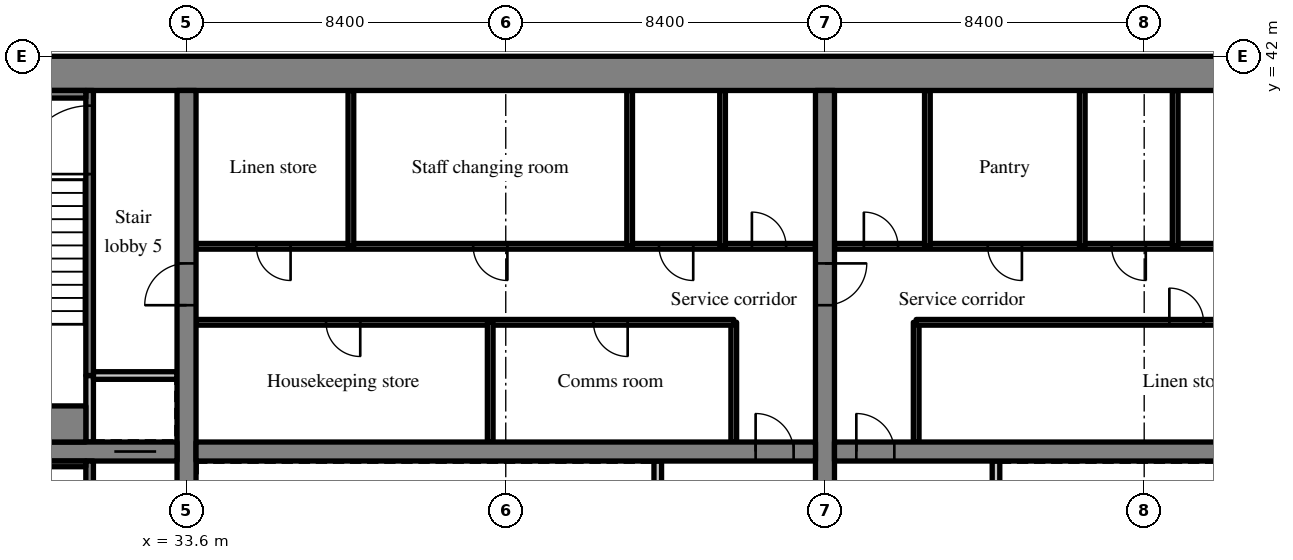
"""IFC4 building model, lengths in metres.
Left out: names, types, materials, properties, quantities, classifications, styles, units other than length and angle.
Written with IfcOpenShell. Run it as: python <this file> out.ifc"""

import sys

from ifc_helpers import new_model, si_unit, direction, frame, frame_2d, origin, place, context, subcontext, project, spatial, rectangle, extrude, source, transform, mapped, element, fill, save


model = new_model("IFC4")
c1 = context("Model", 3, precision=1e-05, world=origin(), true_north=direction((0.0, 1.0)))
c2 = subcontext(c1, "Body", "Model", "MODEL_VIEW")
j1 = project(units=[si_unit("LENGTHUNIT", "METRE"), si_unit("PLANEANGLEUNIT", "RADIAN")], contexts=[c1])
p1 = place(None, origin())
s1 = spatial("IfcSite", under=j1, at=p1, CompositionType="ELEMENT")
p2 = place(p1, origin())
s2 = spatial("IfcBuilding", under=s1, at=p2, CompositionType="ELEMENT")
p3 = place(p2, frame((0.0, 0.0, 102.8)))
s3 = spatial("IfcBuildingStorey", under=s2, at=p3, CompositionType="ELEMENT", Elevation=102.8)
m1 = source(origin(), c2, "Body", "SweptSolid", [
    extrude(rectangle(XDim=50.4, YDim=0.9, at=frame_2d((25.2, 0.0))), origin(), (0.0, 0.0, 1.0), 3.52),
])
p4 = place(p3, frame((25.2, 41.55, 0.0), z_axis=(0.0, 0.0, 1.0), x_axis=(1.0, 0.0, 0.0)))
e1 = element("IfcWall", 1, at=p4, inside=s3, PredefinedType="SHEAR", context=c2, shape_type="MappedRepresentation", body=[
    mapped(m1, transform((0.0, 0.0, 0.0), scale=1.0)),
])
m2 = source(origin(), c2, "Body", "SweptSolid", [
    extrude(rectangle(XDim=18.2, YDim=0.5, at=frame_2d((9.1, 0.0))), origin(), (0.0, 0.0, 1.0), 3.52),
])
p5 = place(p3, frame((33.6, 22.9, 0.0), z_axis=(0.0, 0.0, 1.0), x_axis=(0.0, 1.0, 0.0)))
e2 = element("IfcWall", 2, at=p5, inside=s3, PredefinedType="SHEAR", context=c2, shape_type="MappedRepresentation", body=[
    mapped(m2, transform((0.0, 0.0, 0.0), scale=1.0)),
])
m3 = source(origin(), c2, "Body", "SweptSolid", [
    extrude(rectangle(XDim=1.1, YDim=2.1, at=frame_2d((0.55, 1.05))), frame((0.0, 0.26, 0.0), z_axis=(0.0, -1.0, 0.0), x_axis=(1.0, 0.0, 0.0)), (0.0, 0.0, 1.0), 0.52),
])
p6 = place(p5, frame((12.55, 0.0, 0.0)))
e3 = element("IfcOpeningElement", 3, at=p6, cuts=e2, PredefinedType="OPENING", context=c2, shape_type="MappedRepresentation", body=[
    mapped(m3, transform((0.0, 0.0, 0.0), scale=1.0)),
])
p7 = place(p3, frame((50.4, 22.9, 0.0), z_axis=(0.0, 0.0, 1.0), x_axis=(0.0, 1.0, 0.0)))
e4 = element("IfcWall", 4, at=p7, inside=s3, PredefinedType="SHEAR", context=c2, shape_type="MappedRepresentation", body=[
    mapped(m2, transform((0.0, 0.0, 0.0), scale=1.0)),
])
p8 = place(p7, frame((12.55, 0.0, 0.0)))
e5 = element("IfcOpeningElement", 5, at=p8, cuts=e4, PredefinedType="OPENING", context=c2, shape_type="MappedRepresentation", body=[
    mapped(m3, transform((0.0, 0.0, 0.0), scale=1.0)),
])
m4 = source(origin(), c2, "Body", "SweptSolid", [
    extrude(rectangle(XDim=7.25, YDim=0.5, at=frame_2d((3.625, 0.0))), origin(), (0.0, 0.0, 1.0), 3.52),
])
p9 = place(p3, frame((26.1, 31.6, 0.0), z_axis=(0.0, 0.0, 1.0), x_axis=(1.0, 0.0, 0.0)))
e6 = element("IfcWall", 6, at=p9, inside=s3, PredefinedType="SHEAR", context=c2, shape_type="MappedRepresentation", body=[
    mapped(m4, transform((0.0, 0.0, 0.0), scale=1.0)),
])
p10 = place(p9, frame((5.6, 0.0, 0.0)))
e7 = element("IfcOpeningElement", 7, at=p10, cuts=e6, PredefinedType="OPENING", context=c2, shape_type="MappedRepresentation", body=[
    mapped(m3, transform((0.0, 0.0, 0.0), scale=1.0)),
])
m5 = source(origin(), c2, "Body", "SweptSolid", [
    extrude(rectangle(XDim=16.3, YDim=0.5, at=frame_2d((8.15, 0.0))), origin(), (0.0, 0.0, 1.0), 3.52),
])
p11 = place(p3, frame((33.85, 31.6, 0.0), z_axis=(0.0, 0.0, 1.0), x_axis=(1.0, 0.0, 0.0)))
e8 = element("IfcWall", 8, at=p11, inside=s3, PredefinedType="SHEAR", context=c2, shape_type="MappedRepresentation", body=[
    mapped(m5, transform((0.0, 0.0, 0.0), scale=1.0)),
])
m6 = source(origin(), c2, "Body", "SweptSolid", [
    extrude(rectangle(XDim=1.0, YDim=2.1, at=frame_2d((0.5, 1.05))), frame((0.0, 0.26, 0.0), z_axis=(0.0, -1.0, 0.0), x_axis=(1.0, 0.0, 0.0)), (0.0, 0.0, 1.0), 0.52),
])
p12 = place(p11, frame((14.725, 0.0, 0.0)))
e9 = element("IfcOpeningElement", 9, at=p12, cuts=e8, PredefinedType="OPENING", context=c2, shape_type="MappedRepresentation", body=[
    mapped(m6, transform((0.0, 0.0, 0.0), scale=1.0)),
])
m7 = source(origin(), c2, "Body", "SweptSolid", [
    extrude(rectangle(XDim=16.3, YDim=0.5, at=frame_2d((8.15, 0.0))), origin(), (0.0, 0.0, 1.0), 3.52),
])
p13 = place(p3, frame((50.65, 31.6, 0.0), z_axis=(0.0, 0.0, 1.0), x_axis=(1.0, 0.0, 0.0)))
e10 = element("IfcWall", 10, at=p13, inside=s3, PredefinedType="SHEAR", context=c2, shape_type="MappedRepresentation", body=[
    mapped(m7, transform((0.0, 0.0, 0.0), scale=1.0)),
])
p14 = place(p13, frame((0.575, 0.0, 0.0)))
e11 = element("IfcOpeningElement", 11, at=p14, cuts=e10, PredefinedType="OPENING", context=c2, shape_type="MappedRepresentation", body=[
    mapped(m6, transform((0.0, 0.0, 0.0), scale=1.0)),
])
m8 = source(origin(), c2, "Body", "SweptSolid", [
    extrude(rectangle(XDim=2.55, YDim=0.2, at=frame_2d((1.275, 0.0))), origin(), (0.0, 0.0, 1.0), 3.52),
])
p15 = place(p3, frame((46.0, 28.8, 0.0), z_axis=(0.0, 0.0, 1.0), x_axis=(0.0, 1.0, 0.0)))
e12 = element("IfcWall", 12, at=p15, inside=s3, PredefinedType="SOLIDWALL", context=c2, shape_type="MappedRepresentation", body=[
    mapped(m8, transform((0.0, 0.0, 0.0), scale=1.0)),
])
m9 = source(origin(), c2, "Body", "SweptSolid", [
    extrude(rectangle(XDim=3.15, YDim=0.15, at=frame_2d((1.575, 0.0))), origin(), (0.0, 0.0, 1.0), 3.52),
])
p16 = place(p3, frame((48.0, 31.85, 0.0), z_axis=(0.0, 0.0, 1.0), x_axis=(0.0, 1.0, 0.0)))
e13 = element("IfcWall", 13, at=p16, inside=s3, PredefinedType="PARTITIONING", context=c2, shape_type="MappedRepresentation", body=[
    mapped(m9, transform((0.0, 0.0, 0.0), scale=1.0)),
])
m10 = source(origin(), c2, "Body", "SweptSolid", [
    extrude(rectangle(XDim=14.15, YDim=0.15, at=frame_2d((7.075, 0.0))), origin(), (0.0, 0.0, 1.0), 3.52),
])
p17 = place(p3, frame((33.85, 35.0, 0.0), z_axis=(0.0, 0.0, 1.0), x_axis=(1.0, 0.0, 0.0)))
e14 = element("IfcWall", 14, at=p17, inside=s3, PredefinedType="PARTITIONING", context=c2, shape_type="MappedRepresentation", body=[
    mapped(m10, transform((0.0, 0.0, 0.0), scale=1.0)),
])
m11 = source(origin(), c2, "Body", "SweptSolid", [
    extrude(rectangle(XDim=0.9, YDim=2.1, at=frame_2d((0.45, 1.05))), frame((0.0, 0.085, 0.0), z_axis=(0.0, -1.0, 0.0), x_axis=(1.0, 0.0, 0.0)), (0.0, 0.0, 1.0), 0.17),
])
p18 = place(p17, frame((3.421, 0.0, 0.0)))
e15 = element("IfcOpeningElement", 15, at=p18, cuts=e14, PredefinedType="OPENING", context=c2, shape_type="MappedRepresentation", body=[
    mapped(m11, transform((0.0, 0.0, 0.0), scale=1.0)),
])
p19 = place(p17, frame((10.458, 0.0, 0.0)))
e16 = element("IfcOpeningElement", 16, at=p19, cuts=e14, PredefinedType="OPENING", context=c2, shape_type="MappedRepresentation", body=[
    mapped(m11, transform((0.0, 0.0, 0.0), scale=1.0)),
])
m12 = source(origin(), c2, "Body", "SweptSolid", [
    extrude(rectangle(XDim=16.3, YDim=0.15, at=frame_2d((8.15, 0.0))), origin(), (0.0, 0.0, 1.0), 3.52),
])
p20 = place(p3, frame((33.85, 37.0, 0.0), z_axis=(0.0, 0.0, 1.0), x_axis=(1.0, 0.0, 0.0)))
e17 = element("IfcWall", 17, at=p20, inside=s3, PredefinedType="PARTITIONING", context=c2, shape_type="MappedRepresentation", body=[
    mapped(m12, transform((0.0, 0.0, 0.0), scale=1.0)),
])
p21 = place(p20, frame((1.588, 0.0, 0.0)))
e18 = element("IfcOpeningElement", 18, at=p21, cuts=e17, PredefinedType="OPENING", context=c2, shape_type="MappedRepresentation", body=[
    mapped(m11, transform((0.0, 0.0, 0.0), scale=1.0)),
])
p22 = place(p20, frame((7.293, 0.0, 0.0)))
e19 = element("IfcOpeningElement", 19, at=p22, cuts=e17, PredefinedType="OPENING", context=c2, shape_type="MappedRepresentation", body=[
    mapped(m11, transform((0.0, 0.0, 0.0), scale=1.0)),
])
p23 = place(p20, frame((12.183, 0.0, 0.0)))
e20 = element("IfcOpeningElement", 20, at=p23, cuts=e17, PredefinedType="OPENING", context=c2, shape_type="MappedRepresentation", body=[
    mapped(m11, transform((0.0, 0.0, 0.0), scale=1.0)),
])
p24 = place(p20, frame((14.627, 0.0, 0.0)))
e21 = element("IfcOpeningElement", 21, at=p24, cuts=e17, PredefinedType="OPENING", context=c2, shape_type="MappedRepresentation", body=[
    mapped(m11, transform((0.0, 0.0, 0.0), scale=1.0)),
])
p25 = place(p3, frame((41.591, 31.85, 0.0), z_axis=(0.0, 0.0, 1.0), x_axis=(0.0, 1.0, 0.0)))
e22 = element("IfcWall", 22, at=p25, inside=s3, PredefinedType="PARTITIONING", context=c2, shape_type="MappedRepresentation", body=[
    mapped(m9, transform((0.0, 0.0, 0.0), scale=1.0)),
])
m13 = source(origin(), c2, "Body", "SweptSolid", [
    extrude(rectangle(XDim=4.1, YDim=0.15, at=frame_2d((2.05, 0.0))), origin(), (0.0, 0.0, 1.0), 3.52),
])
for number, where, z_axis, x_axis in (
    (23, (37.925, 37.0, 0.0), (0.0, 0.0, 1.0), (0.0, 1.0, 0.0)),
    (24, (45.26, 37.0, 0.0), (0.0, 0.0, 1.0), (0.0, 1.0, 0.0)),
    (25, (47.705, 37.0, 0.0), (0.0, 0.0, 1.0), (0.0, 1.0, 0.0)),
):
    element("IfcWall", number, at=place(p3, frame(where, z_axis=z_axis, x_axis=x_axis)), inside=s3, PredefinedType="PARTITIONING", context=c2, shape_type="MappedRepresentation", body=[
        mapped(m13, transform((0.0, 0.0, 0.0), scale=1.0)),
    ])
m14 = source(origin(), c2, "Body", "SweptSolid", [
    extrude(rectangle(XDim=8.45, YDim=0.2, at=frame_2d((4.225, 0.0))), origin(), (0.0, 0.0, 1.0), 3.52),
])
p26 = place(p3, frame((54.9, 22.9, 0.0), z_axis=(0.0, 0.0, 1.0), x_axis=(0.0, 1.0, 0.0)))
e26 = element("IfcWall", 26, at=p26, inside=s3, PredefinedType="PARTITIONING", context=c2, shape_type="MappedRepresentation", body=[
    mapped(m14, transform((0.0, 0.0, 0.0), scale=1.0)),
])
p27 = place(p3, frame((52.8, 31.85, 0.0), z_axis=(0.0, 0.0, 1.0), x_axis=(0.0, 1.0, 0.0)))
e27 = element("IfcWall", 27, at=p27, inside=s3, PredefinedType="PARTITIONING", context=c2, shape_type="MappedRepresentation", body=[
    mapped(m9, transform((0.0, 0.0, 0.0), scale=1.0)),
])
p28 = place(p3, frame((66.95, 35.0, 0.0), z_axis=(0.0, 0.0, 1.0), x_axis=(-1.0, 0.0, 0.0)))
e28 = element("IfcWall", 28, at=p28, inside=s3, PredefinedType="PARTITIONING", context=c2, shape_type="MappedRepresentation", body=[
    mapped(m10, transform((0.0, 0.0, 0.0), scale=1.0)),
])
p29 = place(p28, frame((6.588, 0.0, 0.0)))
e29 = element("IfcOpeningElement", 29, at=p29, cuts=e28, PredefinedType="OPENING", context=c2, shape_type="MappedRepresentation", body=[
    mapped(m11, transform((0.0, 0.0, 0.0), scale=1.0)),
])
m15 = source(origin(), c2, "Body", "SweptSolid", [
    extrude(rectangle(XDim=16.3, YDim=0.15, at=frame_2d((8.15, 0.0))), origin(), (0.0, 0.0, 1.0), 3.52),
])
p30 = place(p3, frame((66.95, 37.0, 0.0), z_axis=(0.0, 0.0, 1.0), x_axis=(-1.0, 0.0, 0.0)))
e30 = element("IfcWall", 30, at=p30, inside=s3, PredefinedType="PARTITIONING", context=c2, shape_type="MappedRepresentation", body=[
    mapped(m15, transform((0.0, 0.0, 0.0), scale=1.0)),
])
p31 = place(p30, frame((3.218, 0.0, 0.0)))
e31 = element("IfcOpeningElement", 31, at=p31, cuts=e30, PredefinedType="OPENING", context=c2, shape_type="MappedRepresentation", body=[
    mapped(m11, transform((0.0, 0.0, 0.0), scale=1.0)),
])
p32 = place(p30, frame((8.108, 0.0, 0.0)))
e32 = element("IfcOpeningElement", 32, at=p32, cuts=e30, PredefinedType="OPENING", context=c2, shape_type="MappedRepresentation", body=[
    mapped(m11, transform((0.0, 0.0, 0.0), scale=1.0)),
])
p33 = place(p30, frame((11.368, 0.0, 0.0)))
e33 = element("IfcOpeningElement", 33, at=p33, cuts=e30, PredefinedType="OPENING", context=c2, shape_type="MappedRepresentation", body=[
    mapped(m11, transform((0.0, 0.0, 0.0), scale=1.0)),
])
p34 = place(p30, frame((14.627, 0.0, 0.0)))
e34 = element("IfcOpeningElement", 34, at=p34, cuts=e30, PredefinedType="OPENING", context=c2, shape_type="MappedRepresentation", body=[
    mapped(m11, transform((0.0, 0.0, 0.0), scale=1.0)),
])
for number, where, z_axis, x_axis in (
    (35, (59.615, 37.0, 0.0), (0.0, 0.0, 1.0), (0.0, 1.0, 0.0)),
    (36, (57.17, 37.0, 0.0), (0.0, 0.0, 1.0), (0.0, 1.0, 0.0)),
    (37, (53.095, 37.0, 0.0), (0.0, 0.0, 1.0), (0.0, 1.0, 0.0)),
):
    element("IfcWall", number, at=place(p3, frame(where, z_axis=z_axis, x_axis=x_axis)), inside=s3, PredefinedType="PARTITIONING", context=c2, shape_type="MappedRepresentation", body=[
        mapped(m13, transform((0.0, 0.0, 0.0), scale=1.0)),
    ])
m16 = source(origin(), c2, "Body", "SweptSolid", [
    extrude(rectangle(XDim=8.45, YDim=0.2, at=frame_2d((4.225, 0.0))), origin(), (0.0, 0.0, 1.0), 3.52),
])
p35 = place(p3, frame((31.05, 22.9, 0.0), z_axis=(0.0, 0.0, 1.0), x_axis=(0.0, 1.0, 0.0)))
e38 = element("IfcWall", 38, at=p35, inside=s3, PredefinedType="SOLIDWALL", context=c2, shape_type="MappedRepresentation", body=[
    mapped(m16, transform((0.0, 0.0, 0.0), scale=1.0)),
])
m17 = source(origin(), c2, "Body", "SweptSolid", [
    extrude(rectangle(XDim=1.2, YDim=2.1, at=frame_2d((0.6, 1.05))), frame((0.0, 0.11, 0.0), z_axis=(0.0, -1.0, 0.0), x_axis=(1.0, 0.0, 0.0)), (0.0, 0.0, 1.0), 0.22),
])
p36 = place(p35, frame((6.6, 0.0, 0.0)))
e39 = element("IfcOpeningElement", 39, at=p36, cuts=e38, PredefinedType="OPENING", context=c2, shape_type="MappedRepresentation", body=[
    mapped(m17, transform((0.0, 0.0, 0.0), scale=1.0)),
])
m18 = source(origin(), c2, "Body", "SweptSolid", [
    extrude(rectangle(XDim=1.75, YDim=0.2, at=frame_2d((0.875, 0.0))), origin(), (0.0, 0.0, 1.0), 3.52),
])
p37 = place(p3, frame((31.05, 31.85, 0.0), z_axis=(0.0, 0.0, 1.0), x_axis=(0.0, 1.0, 0.0)))
e40 = element("IfcWall", 40, at=p37, inside=s3, PredefinedType="SOLIDWALL", context=c2, shape_type="MappedRepresentation", body=[
    mapped(m18, transform((0.0, 0.0, 0.0), scale=1.0)),
])
m19 = source(origin(), c2, "Body", "SweptSolid", [
    extrude(rectangle(XDim=2.2, YDim=0.2, at=frame_2d((1.1, 0.0))), origin(), (0.0, 0.0, 1.0), 3.52),
])
p38 = place(p3, frame((31.15, 33.6, 0.0), z_axis=(0.0, 0.0, 1.0), x_axis=(1.0, 0.0, 0.0)))
e41 = element("IfcWall", 41, at=p38, inside=s3, PredefinedType="SOLIDWALL", context=c2, shape_type="MappedRepresentation", body=[
    mapped(m19, transform((0.0, 0.0, 0.0), scale=1.0)),
])
m20 = source(origin(), c2, "Body", "SweptSolid", [
    extrude(rectangle(XDim=7.5, YDim=0.2, at=frame_2d((3.75, 0.0))), origin(), (0.0, 0.0, 1.0), 3.52),
])
p39 = place(p3, frame((31.05, 33.6, 0.0), z_axis=(0.0, 0.0, 1.0), x_axis=(0.0, 1.0, 0.0)))
e42 = element("IfcWall", 42, at=p39, inside=s3, PredefinedType="SOLIDWALL", context=c2, shape_type="MappedRepresentation", body=[
    mapped(m20, transform((0.0, 0.0, 0.0), scale=1.0)),
])
m21 = source(origin(), c2, "Body", "SweptSolid", [
    extrude(rectangle(XDim=1.8, YDim=2.1, at=frame_2d((0.9, 1.05))), frame((0.0, 0.11, 0.0), z_axis=(0.0, -1.0, 0.0), x_axis=(1.0, 0.0, 0.0)), (0.0, 0.0, 1.0), 0.22),
])
p40 = place(p39, frame((5.3, 0.0, 0.0)))
e43 = element("IfcOpeningElement", 43, at=p40, cuts=e42, PredefinedType="OPENING", context=c2, shape_type="MappedRepresentation", body=[
    mapped(m21, transform((0.0, 0.0, 0.0), scale=1.0)),
])
m22 = source(origin(), c2, "Body", "SweptSolid", [
    extrude(rectangle(XDim=4.85, YDim=0.15, at=frame_2d((2.425, 0.0))), origin(), (0.0, 0.0, 1.0), 3.52),
])
p41 = place(p3, frame((26.1, 31.275, 0.0), z_axis=(0.0, 0.0, 1.0), x_axis=(1.0, 0.0, 0.0)))
e44 = element("IfcWall", 44, at=p41, inside=s3, PredefinedType="SOLIDWALL", context=c2, shape_type="MappedRepresentation", body=[
    mapped(m22, transform((0.0, 0.0, 0.0), scale=1.0)),
])
m23 = source(origin(), c2, "Body", "SweptSolid", [
    extrude(rectangle(XDim=4.85, YDim=0.2, at=frame_2d((2.425, 0.0))), origin(), (0.0, 0.0, 1.0), 3.52),
])
p42 = place(p3, frame((26.1, 41.0, 0.0), z_axis=(0.0, 0.0, 1.0), x_axis=(1.0, 0.0, 0.0)))
e45 = element("IfcWall", 45, at=p42, inside=s3, PredefinedType="SOLIDWALL", context=c2, shape_type="MappedRepresentation", body=[
    mapped(m23, transform((0.0, 0.0, 0.0), scale=1.0)),
])
m24 = source(origin(), c2, "Body", "SweptSolid", [
    extrude(rectangle(XDim=4.85, YDim=0.95, at=frame_2d((2.425, 0.0))), origin(), (0.0, 0.0, 1.0), 3.52),
])
p43 = place(p3, frame((26.1, 32.325, 0.0), z_axis=(0.0, 0.0, 1.0), x_axis=(1.0, 0.0, 0.0)))
e46 = element("IfcWall", 46, at=p43, inside=s3, PredefinedType="SOLIDWALL", context=c2, shape_type="MappedRepresentation", body=[
    mapped(m24, transform((0.0, 0.0, 0.0), scale=1.0)),
])
m25 = source(origin(), c2, "Body", "SweptSolid", [
    extrude(rectangle(XDim=1.0, YDim=2.1, at=frame_2d((0.5, 1.05))), frame((0.0, 0.025, 0.0), z_axis=(0.0, -1.0, 0.0), x_axis=(1.0, 0.0, 0.0)), (0.0, 0.0, 1.0), 0.05),
])
p44 = place(p12, origin())
e47 = element("IfcDoor", 47, at=p44, inside=s3, OperationType="SINGLE_SWING_LEFT", PredefinedType="DOOR", context=c2, shape_type="MappedRepresentation", body=[
    mapped(m25, transform((0.0, 0.0, 0.0), scale=1.0)),
])
fill(e9, e47)
m26 = source(origin(), c2, "Body", "SweptSolid", [
    extrude(rectangle(XDim=0.9, YDim=2.1, at=frame_2d((0.45, 1.05))), frame((0.0, 0.025, 0.0), z_axis=(0.0, -1.0, 0.0), x_axis=(1.0, 0.0, 0.0)), (0.0, 0.0, 1.0), 0.05),
])
p45 = place(p18, origin())
e48 = element("IfcDoor", 48, at=p45, inside=s3, OperationType="SINGLE_SWING_RIGHT", PredefinedType="DOOR", context=c2, shape_type="MappedRepresentation", body=[
    mapped(m26, transform((0.0, 0.0, 0.0), scale=1.0)),
])
fill(e15, e48)
p46 = place(p19, origin())
e49 = element("IfcDoor", 49, at=p46, inside=s3, OperationType="SINGLE_SWING_RIGHT", PredefinedType="DOOR", context=c2, shape_type="MappedRepresentation", body=[
    mapped(m26, transform((0.0, 0.0, 0.0), scale=1.0)),
])
fill(e16, e49)
p47 = place(p21, origin())
e50 = element("IfcDoor", 50, at=p47, inside=s3, OperationType="SINGLE_SWING_RIGHT", PredefinedType="DOOR", context=c2, shape_type="MappedRepresentation", body=[
    mapped(m26, transform((0.0, 0.0, 0.0), scale=1.0)),
])
fill(e18, e50)
p48 = place(p22, origin())
e51 = element("IfcDoor", 51, at=p48, inside=s3, OperationType="SINGLE_SWING_RIGHT", PredefinedType="DOOR", context=c2, shape_type="MappedRepresentation", body=[
    mapped(m26, transform((0.0, 0.0, 0.0), scale=1.0)),
])
fill(e19, e51)
p49 = place(p23, origin())
e52 = element("IfcDoor", 52, at=p49, inside=s3, OperationType="SINGLE_SWING_RIGHT", PredefinedType="DOOR", context=c2, shape_type="MappedRepresentation", body=[
    mapped(m26, transform((0.0, 0.0, 0.0), scale=1.0)),
])
fill(e20, e52)
p50 = place(p24, origin())
e53 = element("IfcDoor", 53, at=p50, inside=s3, OperationType="SINGLE_SWING_LEFT", PredefinedType="DOOR", context=c2, shape_type="MappedRepresentation", body=[
    mapped(m26, transform((0.0, 0.0, 0.0), scale=1.0)),
])
fill(e21, e53)
p51 = place(p14, origin())
e54 = element("IfcDoor", 54, at=p51, inside=s3, OperationType="SINGLE_SWING_LEFT", PredefinedType="DOOR", context=c2, shape_type="MappedRepresentation", body=[
    mapped(m25, transform((0.0, 0.0, 0.0), scale=1.0)),
])
fill(e11, e54)
p52 = place(p29, origin())
e55 = element("IfcDoor", 55, at=p52, inside=s3, OperationType="SINGLE_SWING_RIGHT", PredefinedType="DOOR", context=c2, shape_type="MappedRepresentation", body=[
    mapped(m26, transform((0.0, 0.0, 0.0), scale=1.0)),
])
fill(e29, e55)
p53 = place(p32, origin())
e56 = element("IfcDoor", 56, at=p53, inside=s3, OperationType="SINGLE_SWING_LEFT", PredefinedType="DOOR", context=c2, shape_type="MappedRepresentation", body=[
    mapped(m26, transform((0.0, 0.0, 0.0), scale=1.0)),
])
fill(e32, e56)
p54 = place(p33, origin())
e57 = element("IfcDoor", 57, at=p54, inside=s3, OperationType="SINGLE_SWING_LEFT", PredefinedType="DOOR", context=c2, shape_type="MappedRepresentation", body=[
    mapped(m26, transform((0.0, 0.0, 0.0), scale=1.0)),
])
fill(e33, e57)
p55 = place(p34, origin())
e58 = element("IfcDoor", 58, at=p55, inside=s3, OperationType="SINGLE_SWING_RIGHT", PredefinedType="DOOR", context=c2, shape_type="MappedRepresentation", body=[
    mapped(m26, transform((0.0, 0.0, 0.0), scale=1.0)),
])
fill(e34, e58)
m27 = source(origin(), c2, "Body", "SweptSolid", [
    extrude(rectangle(XDim=1.1, YDim=2.1, at=frame_2d((0.55, 1.05))), frame((0.0, 0.025, 0.0), z_axis=(0.0, -1.0, 0.0), x_axis=(1.0, 0.0, 0.0)), (0.0, 0.0, 1.0), 0.05),
])
p56 = place(p10, origin())
e59 = element("IfcDoor", 59, at=p56, inside=s3, OperationType="SLIDING_TO_RIGHT", PredefinedType="DOOR", context=c2, shape_type="MappedRepresentation", body=[
    mapped(m27, transform((0.0, 0.0, 0.0), scale=1.0)),
])
fill(e7, e59)
m28 = source(origin(), c2, "Body", "SweptSolid", [
    extrude(rectangle(XDim=1.8, YDim=2.1, at=frame_2d((0.9, 1.05))), frame((0.0, 0.025, 0.0), z_axis=(0.0, -1.0, 0.0), x_axis=(1.0, 0.0, 0.0)), (0.0, 0.0, 1.0), 0.05),
])
p57 = place(p40, origin())
e60 = element("IfcDoor", 60, at=p57, inside=s3, OperationType="SINGLE_SWING_LEFT", PredefinedType="DOOR", context=c2, shape_type="MappedRepresentation", body=[
    mapped(m28, transform((0.0, 0.0, 0.0), scale=1.0)),
])
fill(e43, e60)
p58 = place(p6, origin())
e61 = element("IfcDoor", 61, at=p58, inside=s3, OperationType="SINGLE_SWING_LEFT", PredefinedType="DOOR", context=c2, shape_type="MappedRepresentation", body=[
    mapped(m27, transform((0.0, 0.0, 0.0), scale=1.0)),
])
fill(e3, e61)
p59 = place(p8, origin())
e62 = element("IfcDoor", 62, at=p59, inside=s3, OperationType="SINGLE_SWING_RIGHT", PredefinedType="DOOR", context=c2, shape_type="MappedRepresentation", body=[
    mapped(m27, transform((0.0, 0.0, 0.0), scale=1.0)),
])
fill(e5, e62)
save(model, sys.argv[1])
